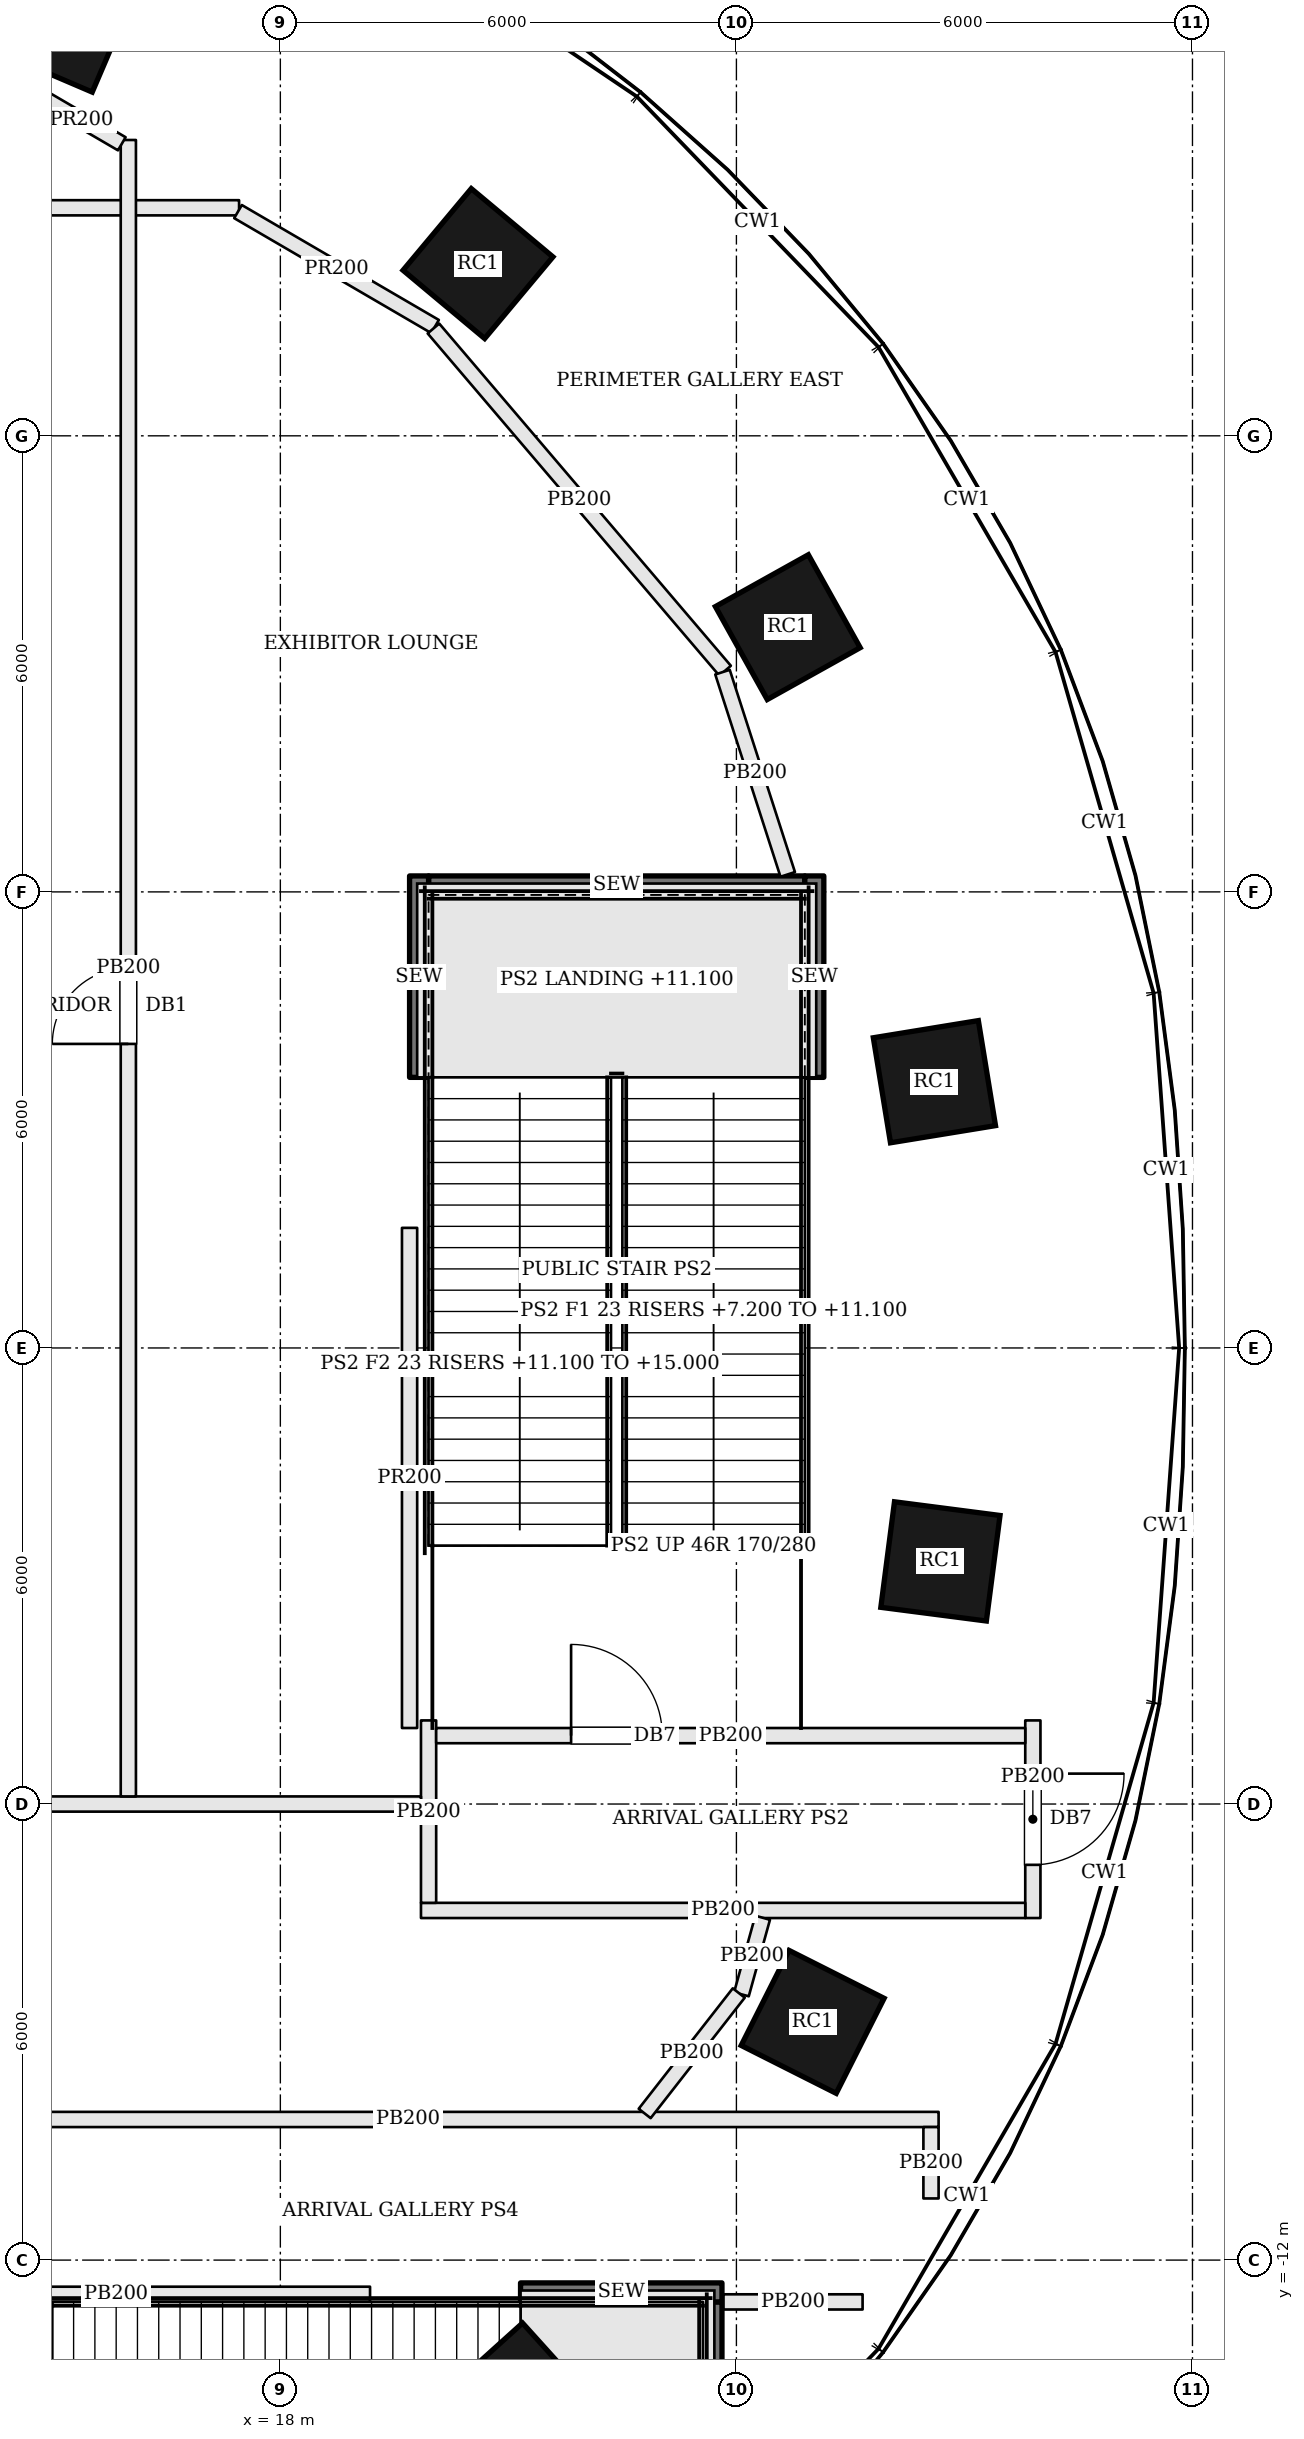
"""IFC4 building model, lengths in metres.
Left out: names, types, materials, properties, quantities, classifications, styles, units other than length and angle.
Written with IfcOpenShell. Run it as: python <this file> out.ifc"""

import sys

from ifc_helpers import new_model, si_unit, direction, frame, frame_2d, origin, origin_2d, place, context, subcontext, project, spatial, rectangle, extrude, element, fill, save


model = new_model("IFC4")
c1 = context("Model", 3, precision=1e-05, world=origin(), true_north=direction((0.0, 1.0)))
c2 = subcontext(c1, "Body", "Model", "MODEL_VIEW")
j1 = project(units=[si_unit("LENGTHUNIT", "METRE"), si_unit("PLANEANGLEUNIT", "RADIAN")], contexts=[c1])
p1 = place(None, origin())
s1 = spatial("IfcSite", under=j1, at=p1, CompositionType="ELEMENT")
p2 = place(p1, origin())
s2 = spatial("IfcBuilding", under=s1, at=p2, CompositionType="ELEMENT")
p3 = place(p2, frame((0.0, 0.0, 7.2)))
s3 = spatial("IfcBuildingStorey", under=s2, at=p3, CompositionType="ELEMENT", Elevation=7.2)
for number, where, z_axis, x_axis in (
    (1, (26.605, 3.503, 0.0), (0.0, 0.0, 1.0), (-0.161, 0.987, 0.0)),
    (2, (24.676, 9.483, 0.0), (0.0, 0.0, 1.0), (-0.487, 0.873, 0.0)),
    (3, (20.6, 14.266, 0.0), (0.0, 0.0, 1.0), (-0.767, 0.641, 0.0)),
    (4, (15.157, 17.441, 0.0), (0.0, 0.0, 1.0), (-0.919, 0.394, 0.0)),
    (5, (21.135, -13.817, 0.0), (0.0, 0.0, 1.0), (0.743, 0.67, 0.0)),
    (6, (25.003, -8.866, 0.0), (0.0, 0.0, 1.0), (0.45, 0.893, 0.0)),
    (7, (26.684, -2.808, 0.0), (0.0, 0.0, 1.0), (0.128, 0.992, 0.0)),
):
    element("IfcColumn", number, at=place(p3, frame(where, z_axis=z_axis, x_axis=x_axis)), inside=s3, PredefinedType="COLUMN", context=c2, shape_type="SweptSolid", body=[
        extrude(rectangle(XDim=1.4, YDim=1.4, at=origin_2d()), origin(), (0.0, 0.0, 1.0), 7.8),
    ])
p4 = place(p3, frame((27.9, -4.9, 0.0), z_axis=(0.0, 0.0, 1.0), x_axis=(0.0, -1.0, 0.0)))
e8 = element("IfcWall", 8, at=p4, inside=s3, PredefinedType="PARTITIONING", context=c2, shape_type="SweptSolid", body=[
    extrude(rectangle(XDim=2.6, YDim=0.2, at=frame_2d((1.3, 0.0))), origin(), (0.0, 0.0, 1.0), 6.83),
])
p5 = place(p4, frame((0.7, 0.0, 0.0)))
e9 = element("IfcOpeningElement", 9, at=p5, cuts=e8, PredefinedType="OPENING", context=c2, shape_type="SweptSolid", body=[
    extrude(rectangle(XDim=1.2, YDim=2.1, at=frame_2d((0.6, 1.05))), frame((0.0, 0.11, 0.0), z_axis=(0.0, -1.0, 0.0), x_axis=(1.0, 0.0, 0.0)), (0.0, 0.0, 1.0), 0.22),
])
p6 = place(p3, frame((27.8, -7.4, 0.0), z_axis=(0.0, 0.0, 1.0), x_axis=(-1.0, 0.0, 0.0)))
e10 = element("IfcWall", 10, at=p6, inside=s3, PredefinedType="PARTITIONING", context=c2, shape_type="SweptSolid", body=[
    extrude(rectangle(XDim=7.95, YDim=0.2, at=frame_2d((3.975, 0.0))), origin(), (0.0, 0.0, 1.0), 6.83),
])
p7 = place(p3, frame((19.95, -7.3, 0.0), z_axis=(0.0, 0.0, 1.0), x_axis=(0.0, 1.0, 0.0)))
e11 = element("IfcWall", 11, at=p7, inside=s3, PredefinedType="PARTITIONING", context=c2, shape_type="SweptSolid", body=[
    extrude(rectangle(XDim=2.4, YDim=0.2, at=frame_2d((1.2, 0.0))), origin(), (0.0, 0.0, 1.0), 6.83),
])
p8 = place(p3, frame((20.05, -5.1, 0.0), z_axis=(0.0, 0.0, 1.0), x_axis=(1.0, 0.0, 0.0)))
e12 = element("IfcWall", 12, at=p8, inside=s3, PredefinedType="PARTITIONING", context=c2, shape_type="SweptSolid", body=[
    extrude(rectangle(XDim=7.75, YDim=0.2, at=frame_2d((3.875, 0.0))), origin(), (0.0, 0.0, 1.0), 6.83),
])
p9 = place(p8, frame((1.775, 0.0, 0.0)))
e13 = element("IfcOpeningElement", 13, at=p9, cuts=e12, PredefinedType="OPENING", context=c2, shape_type="SweptSolid", body=[
    extrude(rectangle(XDim=1.2, YDim=2.1, at=frame_2d((0.6, 1.05))), frame((0.0, 0.11, 0.0), z_axis=(0.0, -1.0, 0.0), x_axis=(1.0, 0.0, 0.0)), (0.0, 0.0, 1.0), 0.22),
])
p10 = place(p3, frame((25.66, -12.55, 0.0), z_axis=(0.0, 0.0, 1.0), x_axis=(-1.0, 0.0, 0.0)))
e14 = element("IfcWall", 14, at=p10, inside=s3, PredefinedType="PARTITIONING", context=c2, shape_type="SweptSolid", body=[
    extrude(rectangle(XDim=1.83, YDim=0.2, at=frame_2d((0.915, 0.0))), origin(), (0.0, 0.0, 1.0), 6.83),
])
p11 = place(p3, frame((19.18, -12.45, 0.0), z_axis=(0.0, 0.0, 1.0), x_axis=(-1.0, 0.0, 0.0)))
e15 = element("IfcWall", 15, at=p11, inside=s3, PredefinedType="PARTITIONING", context=c2, shape_type="SweptSolid", body=[
    extrude(rectangle(XDim=6.68, YDim=0.2, at=frame_2d((3.34, 0.0))), origin(), (0.0, 0.0, 1.0), 6.83),
])
p12 = place(p11, frame((4.78, 0.0, 0.0)))
e16 = element("IfcOpeningElement", 16, at=p12, cuts=e15, PredefinedType="OPENING", context=c2, shape_type="SweptSolid", body=[
    extrude(rectangle(XDim=1.2, YDim=2.1, at=frame_2d((0.6, 1.05))), frame((0.0, 0.11, 0.0), z_axis=(0.0, -1.0, 0.0), x_axis=(1.0, 0.0, 0.0)), (0.0, 0.0, 1.0), 0.22),
])
p13 = place(p3, frame((12.7, -10.15, 0.0), z_axis=(0.0, 0.0, 1.0), x_axis=(1.0, 0.0, 0.0)))
e17 = element("IfcWall", 17, at=p13, inside=s3, PredefinedType="PARTITIONING", context=c2, shape_type="SweptSolid", body=[
    extrude(rectangle(XDim=13.96, YDim=0.2, at=frame_2d((6.98, 0.0))), origin(), (0.0, 0.0, 1.0), 6.83),
])
p14 = place(p3, frame((26.56, -10.25, 0.0), z_axis=(0.0, 0.0, 1.0), x_axis=(0.0, -1.0, 0.0)))
e18 = element("IfcWall", 18, at=p14, inside=s3, PredefinedType="PARTITIONING", context=c2, shape_type="SweptSolid", body=[
    extrude(rectangle(XDim=0.939, YDim=0.2, at=frame_2d((0.469, 0.0))), origin(), (0.0, 0.0, 1.0), 6.83),
])
p15 = place(p3, frame((17.457, 15.0, 0.0), z_axis=(0.0, 0.0, 1.0), x_axis=(-1.0, 0.0, 0.0)))
e19 = element("IfcWall", 19, at=p15, inside=s3, PredefinedType="PARTITIONING", context=c2, shape_type="SweptSolid", body=[
    extrude(rectangle(XDim=25.585, YDim=0.2, at=frame_2d((12.792, 0.0))), origin(), (0.0, 0.0, 1.0), 6.83),
])
p16 = place(p15, frame((23.685, 0.0, 0.0)))
e20 = element("IfcOpeningElement", 20, at=p16, cuts=e19, PredefinedType="OPENING", context=c2, shape_type="SweptSolid", body=[
    extrude(rectangle(XDim=1.2, YDim=2.1, at=frame_2d((0.6, 1.05))), frame((0.0, 0.11, 0.0), z_axis=(0.0, -1.0, 0.0), x_axis=(1.0, 0.0, 0.0)), (0.0, 0.0, 1.0), 0.22),
])
p17 = place(p15, frame((19.771, 0.0, 0.0)))
e21 = element("IfcOpeningElement", 21, at=p17, cuts=e19, PredefinedType="OPENING", context=c2, shape_type="SweptSolid", body=[
    extrude(rectangle(XDim=1.0, YDim=2.1, at=frame_2d((0.5, 1.05))), frame((0.0, 0.11, 0.0), z_axis=(0.0, -1.0, 0.0), x_axis=(1.0, 0.0, 0.0)), (0.0, 0.0, 1.0), 0.22),
])
p18 = place(p15, frame((8.957, 0.0, 0.0)))
e22 = element("IfcOpeningElement", 22, at=p18, cuts=e19, PredefinedType="OPENING", context=c2, shape_type="SweptSolid", body=[
    extrude(rectangle(XDim=1.0, YDim=2.1, at=frame_2d((0.5, 1.05))), frame((0.0, 0.11, 0.0), z_axis=(0.0, -1.0, 0.0), x_axis=(1.0, 0.0, 0.0)), (0.0, 0.0, 1.0), 0.22),
])
p19 = place(p3, frame((-19.85, -6.0, 0.0), z_axis=(0.0, 0.0, 1.0), x_axis=(1.0, 0.0, 0.0)))
e23 = element("IfcWall", 23, at=p19, inside=s3, PredefinedType="PARTITIONING", context=c2, shape_type="SweptSolid", body=[
    extrude(rectangle(XDim=39.7, YDim=0.2, at=frame_2d((19.85, 0.0))), origin(), (0.0, 0.0, 1.0), 6.83),
])
p20 = place(p19, frame((13.172, 0.0, 0.0)))
e24 = element("IfcOpeningElement", 24, at=p20, cuts=e23, PredefinedType="OPENING", context=c2, shape_type="SweptSolid", body=[
    extrude(rectangle(XDim=1.2, YDim=2.1, at=frame_2d((0.6, 1.05))), frame((0.0, 0.11, 0.0), z_axis=(0.0, -1.0, 0.0), x_axis=(1.0, 0.0, 0.0)), (0.0, 0.0, 1.0), 0.22),
])
p21 = place(p19, frame((24.211, 0.0, 0.0)))
e25 = element("IfcOpeningElement", 25, at=p21, cuts=e23, PredefinedType="OPENING", context=c2, shape_type="SweptSolid", body=[
    extrude(rectangle(XDim=2.4, YDim=2.4, at=frame_2d((1.2, 1.2))), frame((0.0, 0.11, 0.0), z_axis=(0.0, -1.0, 0.0), x_axis=(1.0, 0.0, 0.0)), (0.0, 0.0, 1.0), 0.22),
])
p22 = place(p19, frame((7.011, 0.0, 0.0)))
e26 = element("IfcOpeningElement", 26, at=p22, cuts=e23, PredefinedType="OPENING", context=c2, shape_type="SweptSolid", body=[
    extrude(rectangle(XDim=2.4, YDim=2.4, at=frame_2d((1.2, 1.2))), frame((0.0, 0.11, 0.0), z_axis=(0.0, -1.0, 0.0), x_axis=(1.0, 0.0, 0.0)), (0.0, 0.0, 1.0), 0.22),
])
p23 = place(p3, frame((17.443, 14.95, 0.0), z_axis=(0.0, 0.0, 1.0), x_axis=(0.863767096464, -0.503891261153, 0.0)))
e27 = element("IfcWall", 27, at=p23, inside=s3, PredefinedType="PARTITIONING", context=c2, shape_type="SweptSolid", body=[
    extrude(rectangle(XDim=3.0, YDim=0.2, at=frame_2d((1.5, 0.0))), origin(), (0.0, 0.0, 1.0), 6.934),
])
p24 = place(p3, frame((20.014, 13.412, 0.0), z_axis=(0.0, 0.0, 1.0), x_axis=(0.648657765017, -0.761080221714, 0.0)))
e28 = element("IfcWall", 28, at=p24, inside=s3, PredefinedType="PARTITIONING", context=c2, shape_type="SweptSolid", body=[
    extrude(rectangle(XDim=5.916, YDim=0.2, at=frame_2d((2.958, 0.0))), origin(), (0.0, 0.0, 1.0), 6.83),
])
p25 = place(p3, frame((23.817, 8.891, 0.0), z_axis=(0.0, 0.0, 1.0), x_axis=(0.306913488124, -0.951737416942, 0.0)))
e29 = element("IfcWall", 29, at=p25, inside=s3, PredefinedType="PARTITIONING", context=c2, shape_type="SweptSolid", body=[
    extrude(rectangle(XDim=2.796, YDim=0.2, at=frame_2d((1.398, 0.0))), origin(), (0.0, 0.0, 1.0), 6.83),
])
p26 = place(p3, frame((19.7, 1.58, 0.0), z_axis=(0.0, 0.0, 1.0), x_axis=(0.0, -1.0, 0.0)))
e30 = element("IfcWall", 30, at=p26, inside=s3, PredefinedType="PARTITIONING", context=c2, shape_type="SweptSolid", body=[
    extrude(rectangle(XDim=6.58, YDim=0.2, at=frame_2d((3.29, 0.0))), origin(), (0.0, 0.0, 1.0), 6.934),
])
p27 = place(p3, frame((16.0, -5.9, 0.0), z_axis=(0.0, 0.0, 1.0), x_axis=(0.0, 1.0, 0.0)))
e31 = element("IfcWall", 31, at=p27, inside=s3, PredefinedType="PARTITIONING", context=c2, shape_type="SweptSolid", body=[
    extrude(rectangle(XDim=21.792, YDim=0.2, at=frame_2d((10.896, 0.0))), origin(), (0.0, 0.0, 1.0), 6.83),
])
p28 = place(p27, frame((9.9, 0.0, 0.0)))
e32 = element("IfcOpeningElement", 32, at=p28, cuts=e31, PredefinedType="OPENING", context=c2, shape_type="SweptSolid", body=[
    extrude(rectangle(XDim=1.0, YDim=2.1, at=frame_2d((0.5, 1.05))), frame((0.0, 0.11, 0.0), z_axis=(0.0, -1.0, 0.0), x_axis=(1.0, 0.0, 0.0)), (0.0, 0.0, 1.0), 0.22),
])
p29 = place(p3, frame((14.846, 16.465, 0.0), z_axis=(0.0, 0.0, 1.0), x_axis=(0.863786061732, -0.503858749609, 0.0)))
e33 = element("IfcWall", 33, at=p29, inside=s3, PredefinedType="PARTITIONING", context=c2, shape_type="SweptSolid", body=[
    extrude(rectangle(XDim=1.237, YDim=0.2, at=frame_2d((0.618, 0.0))), origin(), (0.0, 0.0, 1.0), 6.934),
])
p30 = place(p3, frame((24.345, -7.496, 0.0), z_axis=(0.0, 0.0, 1.0), x_axis=(-0.267089429493, -0.963671747357, 0.0)))
e34 = element("IfcWall", 34, at=p30, inside=s3, PredefinedType="PARTITIONING", context=c2, shape_type="SweptSolid", body=[
    extrude(rectangle(XDim=1.045, YDim=0.2, at=frame_2d((0.522, 0.0))), origin(), (0.0, 0.0, 1.0), 6.83),
])
p31 = place(p3, frame((24.031, -8.486, 0.0), z_axis=(0.0, 0.0, 1.0), x_axis=(-0.615578080386, -0.788075901768, 0.0)))
e35 = element("IfcWall", 35, at=p31, inside=s3, PredefinedType="PARTITIONING", context=c2, shape_type="SweptSolid", body=[
    extrude(rectangle(XDim=2.011, YDim=0.2, at=frame_2d((1.006, 0.0))), origin(), (0.0, 0.0, 1.0), 6.83),
])
p32 = place(p3, frame((24.9, 6.085, 0.0), z_axis=(0.0, 0.0, 1.0), x_axis=(-1.0, 0.0, 0.0)))
e36 = element("IfcWall", 36, at=p32, inside=s3, PredefinedType="SOLIDWALL", context=c2, shape_type="SweptSolid", body=[
    extrude(rectangle(XDim=4.95, YDim=0.25, at=frame_2d((2.475, 0.0))), origin(), (0.0, 0.0, 1.0), 7.55),
])
for number, where, z_axis, x_axis in (
    (37, (19.825, 3.56, 0.0), (0.0, 0.0, 1.0), (0.0, 1.0, 0.0)),
    (38, (25.025, 3.56, 0.0), (0.0, 0.0, 1.0), (0.0, 1.0, 0.0)),
):
    element("IfcWall", number, at=place(p3, frame(where, z_axis=z_axis, x_axis=x_axis)), inside=s3, PredefinedType="SOLIDWALL", context=c2, shape_type="SweptSolid", body=[
        extrude(rectangle(XDim=2.65, YDim=0.25, at=frame_2d((1.325, 0.0))), origin(), (0.0, 0.0, 1.0), 7.55),
    ])
p33 = place(p3, frame((23.685, -17.5, 0.0), z_axis=(0.0, 0.0, 1.0), x_axis=(0.0, 1.0, 0.0)))
e39 = element("IfcWall", 39, at=p33, inside=s3, PredefinedType="SOLIDWALL", context=c2, shape_type="SweptSolid", body=[
    extrude(rectangle(XDim=4.95, YDim=0.25, at=frame_2d((2.475, 0.0))), origin(), (0.0, 0.0, 1.0), 7.55),
])
p34 = place(p3, frame((21.16, -12.425, 0.0), z_axis=(0.0, 0.0, 1.0), x_axis=(1.0, 0.0, 0.0)))
e40 = element("IfcWall", 40, at=p34, inside=s3, PredefinedType="SOLIDWALL", context=c2, shape_type="SweptSolid", body=[
    extrude(rectangle(XDim=2.65, YDim=0.25, at=frame_2d((1.325, 0.0))), origin(), (0.0, 0.0, 1.0), 7.55),
])
p35 = place(p9, origin())
e41 = element("IfcDoor", 41, at=p35, inside=s3, OperationType="SINGLE_SWING_LEFT", PredefinedType="DOOR", context=c2, shape_type="SweptSolid", body=[
    extrude(rectangle(XDim=1.2, YDim=2.1, at=frame_2d((0.6, 1.05))), frame((0.0, 0.025, 0.0), z_axis=(0.0, -1.0, 0.0), x_axis=(1.0, 0.0, 0.0)), (0.0, 0.0, 1.0), 0.05),
])
fill(e13, e41)
p36 = place(p5, origin())
e42 = element("IfcDoor", 42, at=p36, inside=s3, OperationType="SINGLE_SWING_LEFT", PredefinedType="DOOR", context=c2, shape_type="SweptSolid", body=[
    extrude(rectangle(XDim=1.2, YDim=2.1, at=frame_2d((0.6, 1.05))), frame((0.0, 0.025, 0.0), z_axis=(0.0, -1.0, 0.0), x_axis=(1.0, 0.0, 0.0)), (0.0, 0.0, 1.0), 0.05),
])
fill(e9, e42)
p37 = place(p28, origin())
e43 = element("IfcDoor", 43, at=p37, inside=s3, OperationType="SINGLE_SWING_LEFT", PredefinedType="DOOR", context=c2, shape_type="SweptSolid", body=[
    extrude(rectangle(XDim=1.0, YDim=2.1, at=frame_2d((0.5, 1.05))), frame((0.0, 0.025, 0.0), z_axis=(0.0, -1.0, 0.0), x_axis=(1.0, 0.0, 0.0)), (0.0, 0.0, 1.0), 0.05),
])
fill(e32, e43)
save(model, sys.argv[1])
